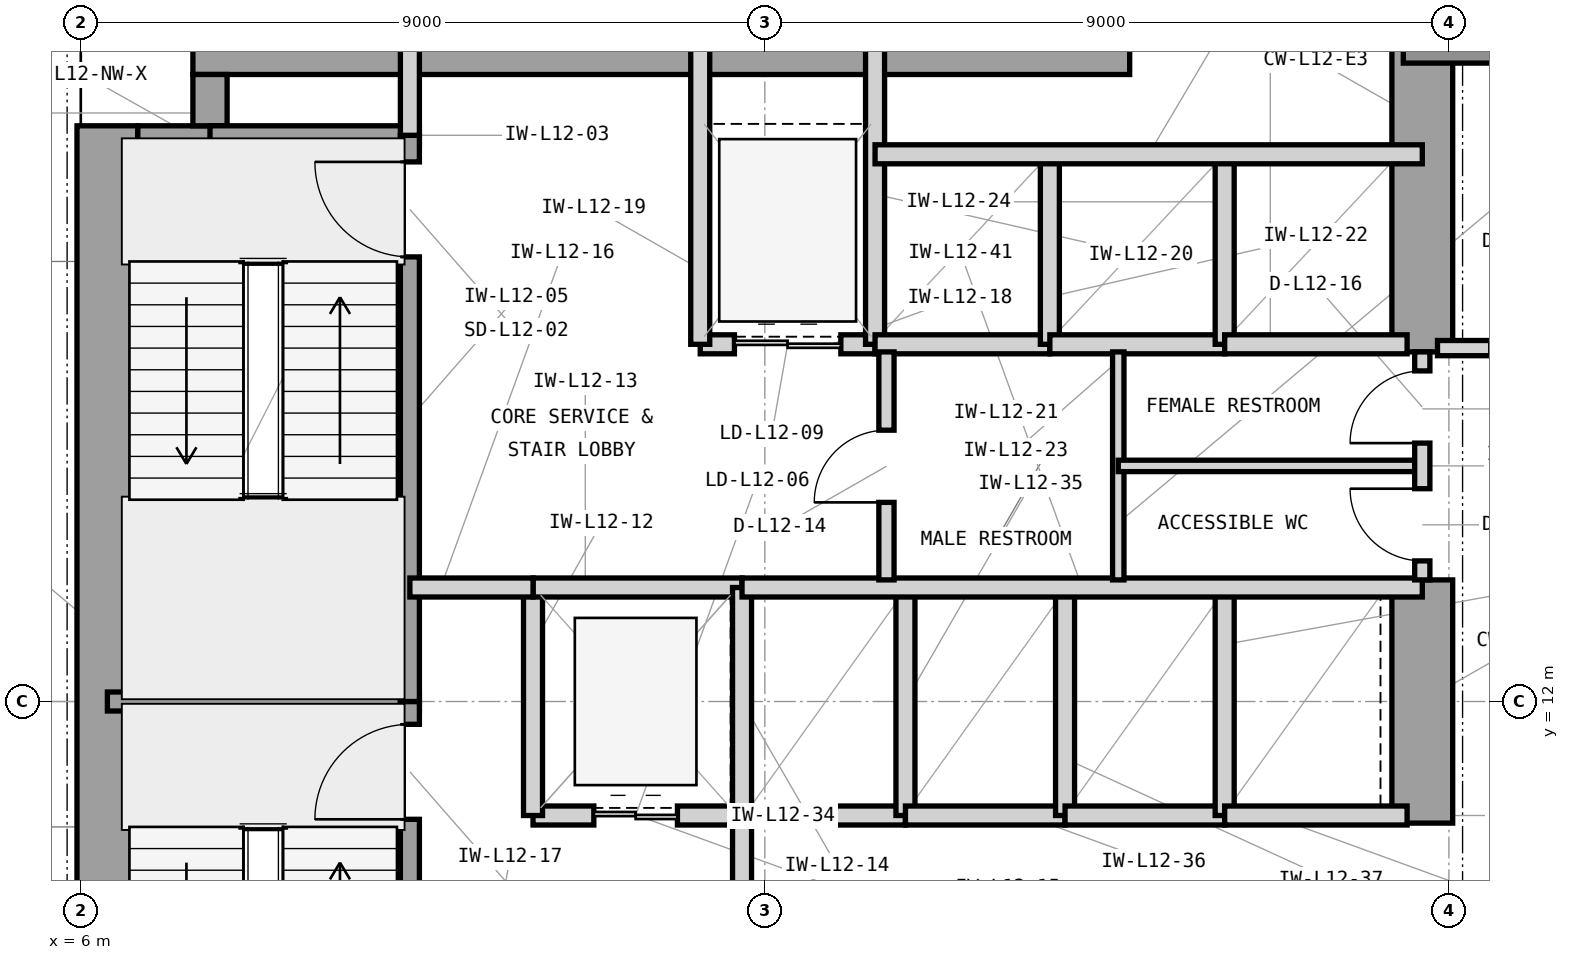
"""IFC4 building model, lengths in metres.
Left out: names, types, materials, properties, quantities, classifications, styles, units other than length and angle.
Written with IfcOpenShell. Run it as: python <this file> out.ifc"""

import sys

from ifc_helpers import new_model, si_unit, direction, frame, frame_2d, origin, origin_2d, place, context, subcontext, project, spatial, rectangle, extrude, element, fill, save


model = new_model("IFC4")
c1 = context("Model", 3, precision=1e-05, world=origin(), true_north=direction((0.0, 1.0)))
c2 = subcontext(c1, "Body", "Model", "MODEL_VIEW")
j1 = project(units=[si_unit("LENGTHUNIT", "METRE"), si_unit("PLANEANGLEUNIT", "RADIAN")], contexts=[c1])
p1 = place(None, origin())
s1 = spatial("IfcSite", under=j1, at=p1, CompositionType="ELEMENT")
p2 = place(p1, origin())
s2 = spatial("IfcBuilding", under=s1, at=p2, CompositionType="ELEMENT")
p3 = place(p2, frame((0.0, 0.0, 55.2)))
s3 = spatial("IfcBuildingStorey", under=s2, at=p3, CompositionType="ELEMENT", Elevation=55.2)
p4 = place(p3, frame((6.35, 4.425, 0.0), z_axis=(0.0, 0.0, 1.0), x_axis=(0.0, 1.0, 0.0)))
e1 = element("IfcWall", 1, at=p4, inside=s3, PredefinedType="SHEAR", context=c2, shape_type="SweptSolid", body=[
    extrude(rectangle(XDim=15.15, YDim=0.8, at=frame_2d((7.575, 0.0))), origin(), (0.0, 0.0, 1.0), 4.2),
])
p5 = place(p3, frame((7.475, 20.65, 0.0), z_axis=(0.0, 0.0, 1.0), x_axis=(1.0, 0.0, 0.0)))
e2 = element("IfcWall", 2, at=p5, inside=s3, PredefinedType="SHEAR", context=c2, shape_type="SweptSolid", body=[
    extrude(rectangle(XDim=12.325, YDim=0.8, at=frame_2d((6.163, 0.0))), origin(), (0.0, 0.0, 1.0), 4.2),
])
p6 = place(p3, frame((23.65, 10.4, 0.0), z_axis=(0.0, 0.0, 1.0), x_axis=(0.0, 1.0, 0.0)))
e3 = element("IfcWall", 3, at=p6, inside=s3, PredefinedType="SHEAR", context=c2, shape_type="SweptSolid", body=[
    extrude(rectangle(XDim=3.2, YDim=0.8, at=frame_2d((1.6, 0.0))), origin(), (0.0, 0.0, 1.0), 4.2),
])
p7 = place(p3, frame((23.65, 16.6, 0.0), z_axis=(0.0, 0.0, 1.0), x_axis=(0.0, 1.0, 0.0)))
e4 = element("IfcWall", 4, at=p7, inside=s3, PredefinedType="SHEAR", context=c2, shape_type="SweptSolid", body=[
    extrude(rectangle(XDim=4.05, YDim=0.8, at=frame_2d((2.025, 0.0))), origin(), (0.0, 0.0, 1.0), 4.2),
])
p8 = place(p3, frame((6.75, 19.35, 0.0), z_axis=(0.0, 0.0, 1.0), x_axis=(1.0, 0.0, 0.0)))
e5 = element("IfcWall", 5, at=p8, inside=s3, PredefinedType="SHEAR", context=c2, shape_type="SweptSolid", body=[
    extrude(rectangle(XDim=1.175, YDim=0.45, at=frame_2d((0.587, 0.0))), origin(), (0.0, 0.0, 1.0), 4.2),
])
p9 = place(p3, frame((7.7, 19.575, 0.0), z_axis=(0.0, 0.0, 1.0), x_axis=(0.0, 1.0, 0.0)))
e6 = element("IfcWall", 6, at=p9, inside=s3, PredefinedType="SHEAR", context=c2, shape_type="SweptSolid", body=[
    extrude(rectangle(XDim=0.675, YDim=0.45, at=frame_2d((0.337, 0.0))), origin(), (0.0, 0.0, 1.0), 4.2),
])
p10 = place(p3, frame((24.0, 21.0, 0.0), z_axis=(0.0, 0.0, 1.0), x_axis=(1.0, 0.0, 0.0)))
e7 = element("IfcColumn", 7, at=p10, inside=s3, PredefinedType="COLUMN", context=c2, shape_type="SweptSolid", body=[
    extrude(rectangle(XDim=1.2, YDim=1.2, at=origin_2d()), origin(), (0.0, 0.0, 1.0), 4.2),
])
p11 = place(p3, frame((6.35, 12.0, 0.0), z_axis=(0.0, 0.0, 1.0), x_axis=(1.0, 0.0, 0.0)))
e8 = element("IfcWall", 8, at=p11, inside=s3, PredefinedType="SHEAR", context=c2, shape_type="SweptSolid", body=[
    extrude(rectangle(XDim=4.105, YDim=0.25, at=frame_2d((2.052, 0.0))), origin(), (0.0, 0.0, 1.0), 4.2),
])
p12 = place(p3, frame((7.7, 19.45, 0.0), z_axis=(0.0, 0.0, 1.0), x_axis=(1.0, 0.0, 0.0)))
e9 = element("IfcWall", 9, at=p12, inside=s3, PredefinedType="SHEAR", context=c2, shape_type="SweptSolid", body=[
    extrude(rectangle(XDim=2.755, YDim=0.25, at=frame_2d((1.377, 0.0))), origin(), (0.0, 0.0, 1.0), 4.2),
])
p13 = place(p3, frame((10.33, 4.55, 0.0), z_axis=(0.0, 0.0, 1.0), x_axis=(0.0, 1.0, 0.0)))
e10 = element("IfcWall", 10, at=p13, inside=s3, PredefinedType="SHEAR", context=c2, shape_type="SweptSolid", body=[
    extrude(rectangle(XDim=7.45, YDim=0.25, at=frame_2d((3.725, 0.0))), origin(), (0.0, 0.0, 1.0), 4.2),
])
p14 = place(p13, frame((5.9, 0.0, 0.0)))
e11 = element("IfcOpeningElement", 11, at=p14, cuts=e10, PredefinedType="OPENING", context=c2, shape_type="SweptSolid", body=[
    extrude(rectangle(XDim=1.25, YDim=2.2, at=frame_2d((0.625, 1.1))), frame((0.0, 0.135, 0.0), z_axis=(0.0, -1.0, 0.0), x_axis=(1.0, 0.0, 0.0)), (0.0, 0.0, 1.0), 0.27),
])
p15 = place(p3, frame((10.33, 12.0, 0.0), z_axis=(0.0, 0.0, 1.0), x_axis=(0.0, 1.0, 0.0)))
e12 = element("IfcWall", 12, at=p15, inside=s3, PredefinedType="SHEAR", context=c2, shape_type="SweptSolid", body=[
    extrude(rectangle(XDim=7.45, YDim=0.25, at=frame_2d((3.725, 0.0))), origin(), (0.0, 0.0, 1.0), 4.2),
])
p16 = place(p15, frame((5.85, 0.0, 0.0)))
e13 = element("IfcOpeningElement", 13, at=p16, cuts=e12, PredefinedType="OPENING", context=c2, shape_type="SweptSolid", body=[
    extrude(rectangle(XDim=1.25, YDim=2.2, at=frame_2d((0.625, 1.1))), frame((0.0, 0.135, 0.0), z_axis=(0.0, -1.0, 0.0), x_axis=(1.0, 0.0, 0.0)), (0.0, 0.0, 1.0), 0.27),
])
p17 = place(p3, frame((10.33, 19.45, 0.0), z_axis=(0.0, 0.0, 1.0), x_axis=(0.0, 1.0, 0.0)))
e14 = element("IfcWall", 14, at=p17, inside=s3, PredefinedType="PARTITIONING", context=c2, shape_type="SweptSolid", body=[
    extrude(rectangle(XDim=1.2, YDim=0.25, at=frame_2d((0.6, 0.0))), origin(), (0.0, 0.0, 1.0), 3.114),
])
p18 = place(p3, frame((11.95, 10.5, 0.0), z_axis=(0.0, 0.0, 1.0), x_axis=(1.0, 0.0, 0.0)))
e15 = element("IfcWall", 15, at=p18, inside=s3, PredefinedType="PARTITIONING", context=c2, shape_type="SweptSolid", body=[
    extrude(rectangle(XDim=2.75, YDim=0.25, at=frame_2d((1.375, 0.0))), origin(), (0.0, 0.0, 1.0), 3.426),
])
p19 = place(p18, frame((0.8, 0.0, 0.0)))
e16 = element("IfcOpeningElement", 16, at=p19, cuts=e15, PredefinedType="OPENING", context=c2, shape_type="SweptSolid", body=[
    extrude(rectangle(XDim=1.1, YDim=2.25, at=frame_2d((0.55, 1.125))), frame((0.0, 0.135, 0.0), z_axis=(0.0, -1.0, 0.0), x_axis=(1.0, 0.0, 0.0)), (0.0, 0.0, 1.0), 0.27),
])
p20 = place(p3, frame((11.95, 10.5, 0.0), z_axis=(0.0, 0.0, 1.0), x_axis=(0.0, 1.0, 0.0)))
e17 = element("IfcWall", 17, at=p20, inside=s3, PredefinedType="PARTITIONING", context=c2, shape_type="SweptSolid", body=[
    extrude(rectangle(XDim=3.0, YDim=0.25, at=frame_2d((1.5, 0.0))), origin(), (0.0, 0.0, 1.0), 3.97),
])
p21 = place(p3, frame((11.95, 13.5, 0.0), z_axis=(0.0, 0.0, 1.0), x_axis=(1.0, 0.0, 0.0)))
e18 = element("IfcWall", 18, at=p21, inside=s3, PredefinedType="PARTITIONING", context=c2, shape_type="SweptSolid", body=[
    extrude(rectangle(XDim=2.75, YDim=0.25, at=frame_2d((1.375, 0.0))), origin(), (0.0, 0.0, 1.0), 3.426),
])
p22 = place(p3, frame((14.7, 10.5, 0.0), z_axis=(0.0, 0.0, 1.0), x_axis=(0.0, 1.0, 0.0)))
e19 = element("IfcWall", 19, at=p22, inside=s3, PredefinedType="PARTITIONING", context=c2, shape_type="SweptSolid", body=[
    extrude(rectangle(XDim=3.0, YDim=0.25, at=frame_2d((1.5, 0.0))), origin(), (0.0, 0.0, 1.0), 3.97),
])
p23 = place(p3, frame((14.7, 6.7, 0.0), z_axis=(0.0, 0.0, 1.0), x_axis=(0.0, 1.0, 0.0)))
e20 = element("IfcWall", 20, at=p23, inside=s3, PredefinedType="PARTITIONING", context=c2, shape_type="SweptSolid", body=[
    extrude(rectangle(XDim=3.8, YDim=0.25, at=frame_2d((1.9, 0.0))), origin(), (0.0, 0.0, 1.0), 3.97),
])
p24 = place(p23, frame((1.3, 0.0, 0.0)))
e21 = element("IfcOpeningElement", 21, at=p24, cuts=e20, PredefinedType="OPENING", context=c2, shape_type="SweptSolid", body=[
    extrude(rectangle(XDim=1.2, YDim=2.2, at=frame_2d((0.6, 1.1))), frame((0.0, 0.135, 0.0), z_axis=(0.0, -1.0, 0.0), x_axis=(1.0, 0.0, 0.0)), (0.0, 0.0, 1.0), 0.27),
])
p25 = place(p3, frame((10.33, 13.5, 0.0), z_axis=(0.0, 0.0, 1.0), x_axis=(1.0, 0.0, 0.0)))
e22 = element("IfcWall", 22, at=p25, inside=s3, PredefinedType="PARTITIONING", context=c2, shape_type="SweptSolid", body=[
    extrude(rectangle(XDim=1.62, YDim=0.25, at=frame_2d((0.81, 0.0))), origin(), (0.0, 0.0, 1.0), 3.426),
])
p26 = place(p3, frame((14.15, 16.7, 0.0), z_axis=(0.0, 0.0, 1.0), x_axis=(1.0, 0.0, 0.0)))
e23 = element("IfcWall", 23, at=p26, inside=s3, PredefinedType="PARTITIONING", context=c2, shape_type="SweptSolid", body=[
    extrude(rectangle(XDim=2.3, YDim=0.25, at=frame_2d((1.15, 0.0))), origin(), (0.0, 0.0, 1.0), 3.426),
])
p27 = place(p26, frame((0.45, 0.0, 0.0)))
e24 = element("IfcOpeningElement", 24, at=p27, cuts=e23, PredefinedType="OPENING", context=c2, shape_type="SweptSolid", body=[
    extrude(rectangle(XDim=1.4, YDim=2.35, at=frame_2d((0.7, 1.175))), frame((0.0, 0.135, 0.0), z_axis=(0.0, -1.0, 0.0), x_axis=(1.0, 0.0, 0.0)), (0.0, 0.0, 1.0), 0.27),
])
for number, where, z_axis, x_axis in (
    (25, (14.15, 16.7, 0.0), (0.0, 0.0, 1.0), (0.0, 1.0, 0.0)),
    (26, (16.45, 16.7, 0.0), (0.0, 0.0, 1.0), (0.0, 1.0, 0.0)),
):
    element("IfcWall", number, at=place(p3, frame(where, z_axis=z_axis, x_axis=x_axis)), inside=s3, PredefinedType="PARTITIONING", context=c2, shape_type="SweptSolid", body=[
        extrude(rectangle(XDim=3.95, YDim=0.25, at=frame_2d((1.975, 0.0))), origin(), (0.0, 0.0, 1.0), 3.97),
    ])
p28 = place(p3, frame((16.45, 16.7, 0.0), z_axis=(0.0, 0.0, 1.0), x_axis=(1.0, 0.0, 0.0)))
e27 = element("IfcWall", 27, at=p28, inside=s3, PredefinedType="PARTITIONING", context=c2, shape_type="SweptSolid", body=[
    extrude(rectangle(XDim=2.3, YDim=0.25, at=frame_2d((1.15, 0.0))), origin(), (0.0, 0.0, 1.0), 3.426),
])
p29 = place(p3, frame((18.75, 16.7, 0.0), z_axis=(0.0, 0.0, 1.0), x_axis=(0.0, 1.0, 0.0)))
e28 = element("IfcWall", 28, at=p29, inside=s3, PredefinedType="PARTITIONING", context=c2, shape_type="SweptSolid", body=[
    extrude(rectangle(XDim=2.5, YDim=0.25, at=frame_2d((1.25, 0.0))), origin(), (0.0, 0.0, 1.0), 3.97),
])
p30 = place(p3, frame((18.75, 16.7, 0.0), z_axis=(0.0, 0.0, 1.0), x_axis=(1.0, 0.0, 0.0)))
e29 = element("IfcWall", 29, at=p30, inside=s3, PredefinedType="PARTITIONING", context=c2, shape_type="SweptSolid", body=[
    extrude(rectangle(XDim=2.3, YDim=0.25, at=frame_2d((1.15, 0.0))), origin(), (0.0, 0.0, 1.0), 3.426),
])
p31 = place(p3, frame((21.05, 16.7, 0.0), z_axis=(0.0, 0.0, 1.0), x_axis=(0.0, 1.0, 0.0)))
e30 = element("IfcWall", 30, at=p31, inside=s3, PredefinedType="PARTITIONING", context=c2, shape_type="SweptSolid", body=[
    extrude(rectangle(XDim=2.5, YDim=0.25, at=frame_2d((1.25, 0.0))), origin(), (0.0, 0.0, 1.0), 3.97),
])
p32 = place(p3, frame((21.05, 16.7, 0.0), z_axis=(0.0, 0.0, 1.0), x_axis=(1.0, 0.0, 0.0)))
e31 = element("IfcWall", 31, at=p32, inside=s3, PredefinedType="PARTITIONING", context=c2, shape_type="SweptSolid", body=[
    extrude(rectangle(XDim=2.4, YDim=0.25, at=frame_2d((1.2, 0.0))), origin(), (0.0, 0.0, 1.0), 3.426),
])
p33 = place(p3, frame((16.45, 19.2, 0.0), z_axis=(0.0, 0.0, 1.0), x_axis=(1.0, 0.0, 0.0)))
e32 = element("IfcWall", 32, at=p33, inside=s3, PredefinedType="PARTITIONING", context=c2, shape_type="SweptSolid", body=[
    extrude(rectangle(XDim=7.2, YDim=0.25, at=frame_2d((3.6, 0.0))), origin(), (0.0, 0.0, 1.0), 3.97),
])
p34 = place(p3, frame((14.7, 10.5, 0.0), z_axis=(0.0, 0.0, 1.0), x_axis=(1.0, 0.0, 0.0)))
e33 = element("IfcWall", 33, at=p34, inside=s3, PredefinedType="PARTITIONING", context=c2, shape_type="SweptSolid", body=[
    extrude(rectangle(XDim=2.15, YDim=0.25, at=frame_2d((1.075, 0.0))), origin(), (0.0, 0.0, 1.0), 3.426),
])
p35 = place(p3, frame((16.85, 10.5, 0.0), z_axis=(0.0, 0.0, 1.0), x_axis=(0.0, 1.0, 0.0)))
e34 = element("IfcWall", 34, at=p35, inside=s3, PredefinedType="PARTITIONING", context=c2, shape_type="SweptSolid", body=[
    extrude(rectangle(XDim=3.0, YDim=0.25, at=frame_2d((1.5, 0.0))), origin(), (0.0, 0.0, 1.0), 3.97),
])
p36 = place(p3, frame((16.85, 10.5, 0.0), z_axis=(0.0, 0.0, 1.0), x_axis=(1.0, 0.0, 0.0)))
e35 = element("IfcWall", 35, at=p36, inside=s3, PredefinedType="PARTITIONING", context=c2, shape_type="SweptSolid", body=[
    extrude(rectangle(XDim=2.1, YDim=0.25, at=frame_2d((1.05, 0.0))), origin(), (0.0, 0.0, 1.0), 3.426),
])
p37 = place(p3, frame((18.95, 10.5, 0.0), z_axis=(0.0, 0.0, 1.0), x_axis=(0.0, 1.0, 0.0)))
e36 = element("IfcWall", 36, at=p37, inside=s3, PredefinedType="PARTITIONING", context=c2, shape_type="SweptSolid", body=[
    extrude(rectangle(XDim=3.0, YDim=0.25, at=frame_2d((1.5, 0.0))), origin(), (0.0, 0.0, 1.0), 3.97),
])
p38 = place(p3, frame((18.95, 10.5, 0.0), z_axis=(0.0, 0.0, 1.0), x_axis=(1.0, 0.0, 0.0)))
e37 = element("IfcWall", 37, at=p38, inside=s3, PredefinedType="PARTITIONING", context=c2, shape_type="SweptSolid", body=[
    extrude(rectangle(XDim=2.1, YDim=0.25, at=frame_2d((1.05, 0.0))), origin(), (0.0, 0.0, 1.0), 3.426),
])
p39 = place(p3, frame((21.05, 10.5, 0.0), z_axis=(0.0, 0.0, 1.0), x_axis=(0.0, 1.0, 0.0)))
e38 = element("IfcWall", 38, at=p39, inside=s3, PredefinedType="PARTITIONING", context=c2, shape_type="SweptSolid", body=[
    extrude(rectangle(XDim=3.0, YDim=0.25, at=frame_2d((1.5, 0.0))), origin(), (0.0, 0.0, 1.0), 3.97),
])
p40 = place(p3, frame((21.05, 10.5, 0.0), z_axis=(0.0, 0.0, 1.0), x_axis=(1.0, 0.0, 0.0)))
e39 = element("IfcWall", 39, at=p40, inside=s3, PredefinedType="PARTITIONING", context=c2, shape_type="SweptSolid", body=[
    extrude(rectangle(XDim=2.4, YDim=0.25, at=frame_2d((1.2, 0.0))), origin(), (0.0, 0.0, 1.0), 3.426),
])
p41 = place(p3, frame((14.7, 13.5, 0.0), z_axis=(0.0, 0.0, 1.0), x_axis=(1.0, 0.0, 0.0)))
e40 = element("IfcWall", 40, at=p41, inside=s3, PredefinedType="PARTITIONING", context=c2, shape_type="SweptSolid", body=[
    extrude(rectangle(XDim=8.95, YDim=0.25, at=frame_2d((4.475, 0.0))), origin(), (0.0, 0.0, 1.0), 3.426),
])
p42 = place(p3, frame((16.6, 13.6, 0.0), z_axis=(0.0, 0.0, 1.0), x_axis=(0.0, 1.0, 0.0)))
e41 = element("IfcWall", 41, at=p42, inside=s3, PredefinedType="PARTITIONING", context=c2, shape_type="SweptSolid", body=[
    extrude(rectangle(XDim=3.0, YDim=0.2, at=frame_2d((1.5, 0.0))), origin(), (0.0, 0.0, 1.0), 3.97),
])
p43 = place(p42, frame((1.02, 0.0, 0.0)))
e42 = element("IfcOpeningElement", 42, at=p43, cuts=e41, PredefinedType="OPENING", context=c2, shape_type="SweptSolid", body=[
    extrude(rectangle(XDim=0.95, YDim=2.1, at=frame_2d((0.475, 1.05))), frame((0.0, 0.11, 0.0), z_axis=(0.0, -1.0, 0.0), x_axis=(1.0, 0.0, 0.0)), (0.0, 0.0, 1.0), 0.22),
])
p44 = place(p3, frame((19.65, 13.6, 0.0), z_axis=(0.0, 0.0, 1.0), x_axis=(0.0, 1.0, 0.0)))
e43 = element("IfcWall", 43, at=p44, inside=s3, PredefinedType="PARTITIONING", context=c2, shape_type="SweptSolid", body=[
    extrude(rectangle(XDim=3.0, YDim=0.15, at=frame_2d((1.5, 0.0))), origin(), (0.0, 0.0, 1.0), 3.97),
])
p45 = place(p3, frame((19.65, 15.1, 0.0), z_axis=(0.0, 0.0, 1.0), x_axis=(1.0, 0.0, 0.0)))
e44 = element("IfcWall", 44, at=p45, inside=s3, PredefinedType="PARTITIONING", context=c2, shape_type="SweptSolid", body=[
    extrude(rectangle(XDim=4.0, YDim=0.15, at=frame_2d((2.0, 0.0))), origin(), (0.0, 0.0, 1.0), 3.97),
])
p46 = place(p3, frame((23.65, 13.6, 0.0), z_axis=(0.0, 0.0, 1.0), x_axis=(0.0, 1.0, 0.0)))
e45 = element("IfcWall", 45, at=p46, inside=s3, PredefinedType="PARTITIONING", context=c2, shape_type="SweptSolid", body=[
    extrude(rectangle(XDim=3.0, YDim=0.2, at=frame_2d((1.5, 0.0))), origin(), (0.0, 0.0, 1.0), 3.97),
])
p47 = place(p46, frame((0.25, 0.0, 0.0)))
e46 = element("IfcOpeningElement", 46, at=p47, cuts=e45, PredefinedType="OPENING", context=c2, shape_type="SweptSolid", body=[
    extrude(rectangle(XDim=0.95, YDim=2.1, at=frame_2d((0.475, 1.05))), frame((0.0, 0.11, 0.0), z_axis=(0.0, -1.0, 0.0), x_axis=(1.0, 0.0, 0.0)), (0.0, 0.0, 1.0), 0.22),
])
p48 = place(p46, frame((1.8, 0.0, 0.0)))
e47 = element("IfcOpeningElement", 47, at=p48, cuts=e45, PredefinedType="OPENING", context=c2, shape_type="SweptSolid", body=[
    extrude(rectangle(XDim=0.95, YDim=2.1, at=frame_2d((0.475, 1.05))), frame((0.0, 0.11, 0.0), z_axis=(0.0, -1.0, 0.0), x_axis=(1.0, 0.0, 0.0)), (0.0, 0.0, 1.0), 0.22),
])
p49 = place(p3, frame((23.85, 16.65, 0.0), z_axis=(0.0, 0.0, 1.0), x_axis=(1.0, 0.0, 0.0)))
e48 = element("IfcWall", 48, at=p49, inside=s3, PredefinedType="PARTITIONING", context=c2, shape_type="SweptSolid", body=[
    extrude(rectangle(XDim=2.85, YDim=0.2, at=frame_2d((1.425, 0.0))), origin(), (0.0, 0.0, 1.0), 3.97),
])
p50 = place(p49, frame((0.7, 0.0, 0.0)))
e49 = element("IfcOpeningElement", 49, at=p50, cuts=e48, PredefinedType="OPENING", context=c2, shape_type="SweptSolid", body=[
    extrude(rectangle(XDim=1.0, YDim=2.15, at=frame_2d((0.5, 1.075))), frame((0.0, 0.11, 0.0), z_axis=(0.0, -1.0, 0.0), x_axis=(1.0, 0.0, 0.0)), (0.0, 0.0, 1.0), 0.22),
])
p51 = place(p14, origin())
e50 = element("IfcDoor", 50, at=p51, inside=s3, OperationType="SINGLE_SWING_LEFT", PredefinedType="DOOR", context=c2, shape_type="SweptSolid", body=[
    extrude(rectangle(XDim=1.25, YDim=2.2, at=frame_2d((0.625, 1.1))), frame((0.0, 0.025, 0.0), z_axis=(0.0, -1.0, 0.0), x_axis=(1.0, 0.0, 0.0)), (0.0, 0.0, 1.0), 0.05),
])
fill(e11, e50)
p52 = place(p16, origin())
e51 = element("IfcDoor", 51, at=p52, inside=s3, OperationType="SINGLE_SWING_RIGHT", PredefinedType="DOOR", context=c2, shape_type="SweptSolid", body=[
    extrude(rectangle(XDim=1.25, YDim=2.2, at=frame_2d((0.625, 1.1))), frame((0.0, 0.025, 0.0), z_axis=(0.0, -1.0, 0.0), x_axis=(1.0, 0.0, 0.0)), (0.0, 0.0, 1.0), 0.05),
])
fill(e13, e51)
p53 = place(p19, origin())
e52 = element("IfcDoor", 52, at=p53, inside=s3, OperationType="DOUBLE_DOOR_SLIDING", PredefinedType="DOOR", context=c2, shape_type="SweptSolid", body=[
    extrude(rectangle(XDim=1.1, YDim=2.25, at=frame_2d((0.55, 1.125))), frame((0.0, 0.025, 0.0), z_axis=(0.0, -1.0, 0.0), x_axis=(1.0, 0.0, 0.0)), (0.0, 0.0, 1.0), 0.05),
])
fill(e16, e52)
p54 = place(p27, origin())
e53 = element("IfcDoor", 53, at=p54, inside=s3, OperationType="DOUBLE_DOOR_SLIDING", PredefinedType="DOOR", context=c2, shape_type="SweptSolid", body=[
    extrude(rectangle(XDim=1.4, YDim=2.35, at=frame_2d((0.7, 1.175))), frame((0.0, 0.025, 0.0), z_axis=(0.0, -1.0, 0.0), x_axis=(1.0, 0.0, 0.0)), (0.0, 0.0, 1.0), 0.05),
])
fill(e24, e53)
p55 = place(p43, origin())
e54 = element("IfcDoor", 54, at=p55, inside=s3, OperationType="SINGLE_SWING_LEFT", PredefinedType="DOOR", context=c2, shape_type="SweptSolid", body=[
    extrude(rectangle(XDim=0.95, YDim=2.1, at=frame_2d((0.475, 1.05))), frame((0.0, 0.025, 0.0), z_axis=(0.0, -1.0, 0.0), x_axis=(1.0, 0.0, 0.0)), (0.0, 0.0, 1.0), 0.05),
])
fill(e42, e54)
p56 = place(p47, origin())
e55 = element("IfcDoor", 55, at=p56, inside=s3, OperationType="SINGLE_SWING_RIGHT", PredefinedType="DOOR", context=c2, shape_type="SweptSolid", body=[
    extrude(rectangle(XDim=0.95, YDim=2.1, at=frame_2d((0.475, 1.05))), frame((0.0, 0.025, 0.0), z_axis=(0.0, -1.0, 0.0), x_axis=(1.0, 0.0, 0.0)), (0.0, 0.0, 1.0), 0.05),
])
fill(e46, e55)
p57 = place(p48, origin())
e56 = element("IfcDoor", 56, at=p57, inside=s3, OperationType="SINGLE_SWING_LEFT", PredefinedType="DOOR", context=c2, shape_type="SweptSolid", body=[
    extrude(rectangle(XDim=0.95, YDim=2.1, at=frame_2d((0.475, 1.05))), frame((0.0, 0.025, 0.0), z_axis=(0.0, -1.0, 0.0), x_axis=(1.0, 0.0, 0.0)), (0.0, 0.0, 1.0), 0.05),
])
fill(e47, e56)
save(model, sys.argv[1])
